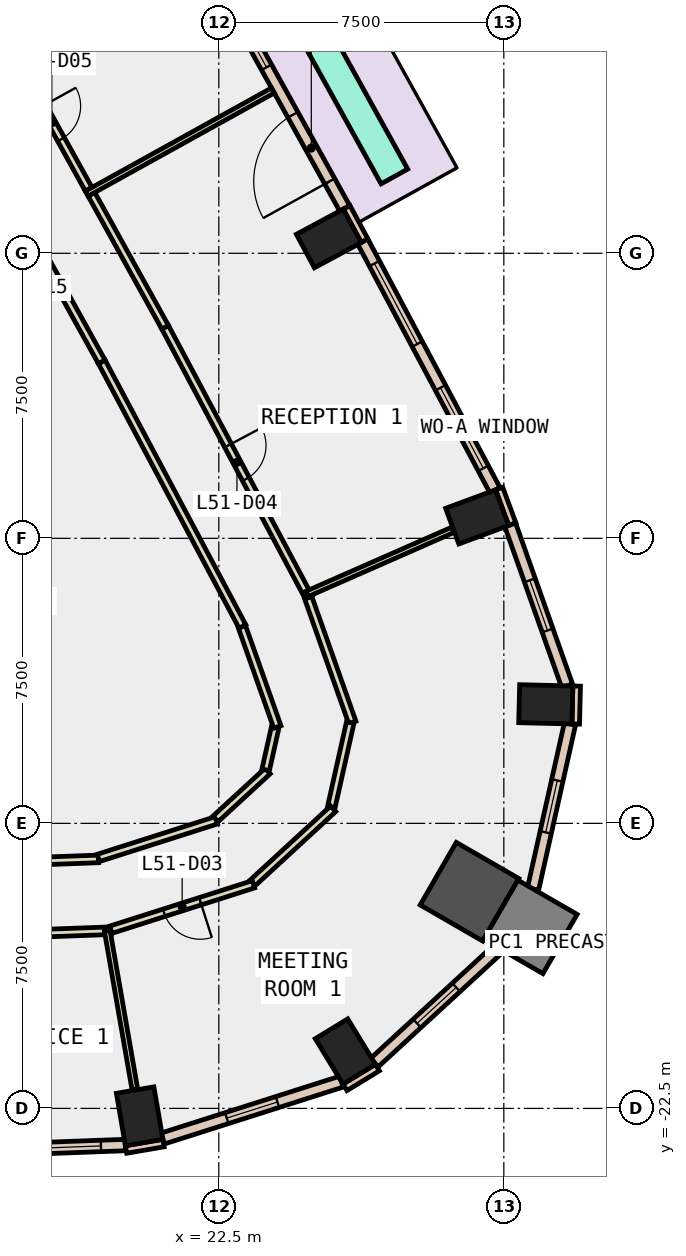
"""IFC4 building model, lengths in metres.
Left out: names, types, materials, properties, quantities, classifications, styles, units other than length and angle.
Written with IfcOpenShell. Run it as: python <this file> out.ifc"""

import sys

from ifc_helpers import new_model, si_unit, direction, frame, frame_2d, origin, origin_2d, place, context, subcontext, project, spatial, rectangle, extrude, element, fill, save


model = new_model("IFC4")
c1 = context("Model", 3, precision=1e-05, world=origin(), true_north=direction((0.0, 1.0)))
c2 = subcontext(c1, "Body", "Model", "MODEL_VIEW")
j1 = project(units=[si_unit("LENGTHUNIT", "METRE"), si_unit("PLANEANGLEUNIT", "RADIAN")], contexts=[c1])
p1 = place(None, origin())
s1 = spatial("IfcSite", under=j1, at=p1, CompositionType="ELEMENT")
p2 = place(p1, origin())
s2 = spatial("IfcBuilding", under=s1, at=p2, CompositionType="ELEMENT")
p3 = place(p2, frame((0.0, 0.0, 227.6)))
s3 = spatial("IfcBuildingStorey", under=s2, at=p3, CompositionType="ELEMENT", Elevation=227.6)
for number, where, z_axis, x_axis in (
    (1, (20.417, -22.708, -0.4), (0.0, 0.0, 1.0), (0.986, 0.169, 0.0)),
    (2, (25.83, -21.003, -0.4), (0.0, 0.0, 1.0), (0.853, 0.521, 0.0)),
):
    element("IfcColumn", number, at=place(p3, frame(where, z_axis=z_axis, x_axis=x_axis)), inside=s3, PredefinedType="COLUMN", context=c2, shape_type="SweptSolid", body=[
        extrude(rectangle(XDim=1.0, YDim=1.4, at=origin_2d()), origin(), (0.0, 0.0, 1.0), 4.2),
    ])
p4 = place(p3, frame((29.097, -16.799, -0.4), z_axis=(0.0, 0.0, 1.0), x_axis=(-0.866025403784, 0.5, 0.0)))
e3 = element("IfcColumn", 3, at=p4, inside=s3, PredefinedType="COLUMN", context=c2, shape_type="SweptSolid", body=[
    extrude(rectangle(XDim=1.9, YDim=1.9, at=origin_2d()), origin(), (0.0, 0.0, 1.0), 4.2),
])
for number, where, z_axis, x_axis in (
    (4, (31.104, -11.868, -0.4), (0.0, 0.0, 1.0), (0.025, 1.0, 0.0)),
    (5, (29.299, -6.936, -0.4), (0.0, 0.0, 1.0), (-0.347, 0.938, 0.0)),
    (6, (25.395, 0.391, -0.4), (0.0, 0.0, 1.0), (-0.474, 0.88, 0.0)),
):
    element("IfcColumn", number, at=place(p3, frame(where, z_axis=z_axis, x_axis=x_axis)), inside=s3, PredefinedType="COLUMN", context=c2, shape_type="SweptSolid", body=[
        extrude(rectangle(XDim=1.0, YDim=1.4, at=origin_2d()), origin(), (0.0, 0.0, 1.0), 4.2),
    ])
p5 = place(p3, frame((30.699, -17.724, -0.4), z_axis=(0.0, 0.0, 1.0), x_axis=(-0.866025403784, 0.5, 0.0)))
e7 = element("IfcColumn", 7, at=p5, inside=s3, PredefinedType="COLUMN", context=c2, shape_type="SweptSolid", body=[
    extrude(rectangle(XDim=1.8, YDim=1.8, at=origin_2d()), origin(), (0.0, 0.0, 1.0), 4.2),
])
p6 = place(p3, frame((30.223, -7.128, 0.0), z_axis=(0.0, 0.0, 1.0), x_axis=(-0.346892928577, 0.937904737222, 0.0)))
e8 = element("IfcWall", 8, at=p6, inside=s3, PredefinedType="STANDARD", context=c2, shape_type="SweptSolid", body=[
    extrude(rectangle(XDim=1.0, YDim=0.2, at=frame_2d((0.5, 0.0))), origin(), (0.0, 0.0, 1.0), 3.8),
])
for number, where, z_axis, x_axis in (
    (9, (26.336, 0.33, 0.0), (0.0, 0.0, 1.0), (-0.474, 0.881, 0.0)),
    (10, (20.059, -23.581, 0.0), (0.0, 0.0, 1.0), (0.986, 0.169, 0.0)),
):
    element("IfcWall", number, at=place(p3, frame(where, z_axis=z_axis, x_axis=x_axis)), inside=s3, PredefinedType="STANDARD", context=c2, shape_type="SweptSolid", body=[
        extrude(rectangle(XDim=1.0, YDim=0.2, at=frame_2d((0.5, 0.0))), origin(), (0.0, 0.0, 1.0), 3.8),
    ])
p7 = place(p3, frame((25.82, -21.946, 0.0), z_axis=(0.0, 0.0, 1.0), x_axis=(0.853679739553, 0.520798331677, 0.0)))
e11 = element("IfcWall", 11, at=p7, inside=s3, PredefinedType="STANDARD", context=c2, shape_type="SweptSolid", body=[
    extrude(rectangle(XDim=1.0, YDim=0.2, at=frame_2d((0.5, 0.0))), origin(), (0.0, 0.0, 1.0), 3.8),
])
p8 = place(p3, frame((31.892, -12.387, 0.0), z_axis=(0.0, 0.0, 1.0), x_axis=(0.023942303888, 0.999713341956, 0.0)))
e12 = element("IfcWall", 12, at=p8, inside=s3, PredefinedType="STANDARD", context=c2, shape_type="SweptSolid", body=[
    extrude(rectangle(XDim=0.999, YDim=0.2, at=frame_2d((0.5, 0.0))), origin(), (0.0, 0.0, 1.0), 3.8),
])
p9 = place(p3, frame((14.679, -23.662, 0.0), z_axis=(0.0, 0.0, 1.0), x_axis=(0.999318693414, 0.036907302717, 0.0)))
e13 = element("IfcWall", 13, at=p9, inside=s3, PredefinedType="STANDARD", context=c2, shape_type="SweptSolid", body=[
    extrude(rectangle(XDim=5.365, YDim=0.3, at=frame_2d((2.682, 0.0))), origin(), (0.0, 0.0, 1.0), 3.8),
])
p10 = place(p9, frame((0.641, 0.0, 0.9)))
e14 = element("IfcOpeningElement", 14, at=p10, cuts=e13, PredefinedType="OPENING", context=c2, shape_type="SweptSolid", body=[
    extrude(rectangle(XDim=1.4, YDim=2.6, at=frame_2d((0.7, 1.3))), frame((0.0, 0.16, 0.0), z_axis=(0.0, -1.0, 0.0), x_axis=(1.0, 0.0, 0.0)), (0.0, 0.0, 1.0), 0.32),
])
p11 = place(p9, frame((3.323, 0.0, 0.9)))
e15 = element("IfcOpeningElement", 15, at=p11, cuts=e13, PredefinedType="OPENING", context=c2, shape_type="SweptSolid", body=[
    extrude(rectangle(XDim=1.4, YDim=2.6, at=frame_2d((0.7, 1.3))), frame((0.0, 0.16, 0.0), z_axis=(0.0, -1.0, 0.0), x_axis=(1.0, 0.0, 0.0)), (0.0, 0.0, 1.0), 0.32),
])
p12 = place(p3, frame((21.023, -23.293, 0.0), z_axis=(0.0, 0.0, 1.0), x_axis=(0.952886818649, 0.30332608006, 0.0)))
e16 = element("IfcWall", 16, at=p12, inside=s3, PredefinedType="STANDARD", context=c2, shape_type="SweptSolid", body=[
    extrude(rectangle(XDim=4.939, YDim=0.3, at=frame_2d((2.469, 0.0))), origin(), (0.0, 0.0, 1.0), 3.8),
])
p13 = place(p12, frame((1.769, 0.0, 0.9)))
e17 = element("IfcOpeningElement", 17, at=p13, cuts=e16, PredefinedType="OPENING", context=c2, shape_type="SweptSolid", body=[
    extrude(rectangle(XDim=1.4, YDim=2.6, at=frame_2d((0.7, 1.3))), frame((0.0, 0.16, 0.0), z_axis=(0.0, -1.0, 0.0), x_axis=(1.0, 0.0, 0.0)), (0.0, 0.0, 1.0), 0.32),
])
p14 = place(p3, frame((26.594, -21.296, 0.0), z_axis=(0.0, 0.0, 1.0), x_axis=(0.735927731403, 0.67706009641, 0.0)))
e18 = element("IfcWall", 18, at=p14, inside=s3, PredefinedType="STANDARD", context=c2, shape_type="SweptSolid", body=[
    extrude(rectangle(XDim=4.45, YDim=0.3, at=frame_2d((2.225, 0.0))), origin(), (0.0, 0.0, 1.0), 3.8),
])
p15 = place(p14, frame((1.525, 0.0, 0.9)))
e19 = element("IfcOpeningElement", 19, at=p15, cuts=e18, PredefinedType="OPENING", context=c2, shape_type="SweptSolid", body=[
    extrude(rectangle(XDim=1.4, YDim=2.6, at=frame_2d((0.7, 1.3))), frame((0.0, 0.16, 0.0), z_axis=(0.0, -1.0, 0.0), x_axis=(1.0, 0.0, 0.0)), (0.0, 0.0, 1.0), 0.32),
])
p16 = place(p3, frame((30.769, -16.726, 0.0), z_axis=(0.0, 0.0, 1.0), x_axis=(0.218179157422, 0.975908733062, 0.0)))
e20 = element("IfcWall", 20, at=p16, inside=s3, PredefinedType="STANDARD", context=c2, shape_type="SweptSolid", body=[
    extrude(rectangle(XDim=4.45, YDim=0.3, at=frame_2d((2.225, 0.0))), origin(), (0.0, 0.0, 1.0), 3.8),
])
p17 = place(p16, frame((1.525, 0.0, 0.9)))
e21 = element("IfcOpeningElement", 21, at=p17, cuts=e20, PredefinedType="OPENING", context=c2, shape_type="SweptSolid", body=[
    extrude(rectangle(XDim=1.4, YDim=2.6, at=frame_2d((0.7, 1.3))), frame((0.0, 0.16, 0.0), z_axis=(0.0, -1.0, 0.0), x_axis=(1.0, 0.0, 0.0)), (0.0, 0.0, 1.0), 0.32),
])
p18 = place(p3, frame((31.666, -11.382, 0.0), z_axis=(0.0, 0.0, 1.0), x_axis=(-0.333280640478, 0.942827669663, 0.0)))
e22 = element("IfcWall", 22, at=p18, inside=s3, PredefinedType="STANDARD", context=c2, shape_type="SweptSolid", body=[
    extrude(rectangle(XDim=4.492, YDim=0.3, at=frame_2d((2.246, 0.0))), origin(), (0.0, 0.0, 1.0), 3.8),
])
p19 = place(p18, frame((1.546, 0.0, 0.9)))
e23 = element("IfcOpeningElement", 23, at=p19, cuts=e22, PredefinedType="OPENING", context=c2, shape_type="SweptSolid", body=[
    extrude(rectangle(XDim=1.4, YDim=2.6, at=frame_2d((0.7, 1.3))), frame((0.0, 0.16, 0.0), z_axis=(0.0, -1.0, 0.0), x_axis=(1.0, 0.0, 0.0)), (0.0, 0.0, 1.0), 0.32),
])
p20 = place(p3, frame((29.765, -6.232, 0.0), z_axis=(0.0, 0.0, 1.0), x_axis=(-0.469429229062, 0.882970100797, 0.0)))
e24 = element("IfcWall", 24, at=p20, inside=s3, PredefinedType="STANDARD", context=c2, shape_type="SweptSolid", body=[
    extrude(rectangle(XDim=7.404, YDim=0.3, at=frame_2d((3.702, 0.0))), origin(), (0.0, 0.0, 1.0), 3.8),
])
p21 = place(p20, frame((0.651, 0.0, 0.9)))
e25 = element("IfcOpeningElement", 25, at=p21, cuts=e24, PredefinedType="OPENING", context=c2, shape_type="SweptSolid", body=[
    extrude(rectangle(XDim=2.4, YDim=2.6, at=frame_2d((1.2, 1.3))), frame((0.0, 0.16, 0.0), z_axis=(0.0, -1.0, 0.0), x_axis=(1.0, 0.0, 0.0)), (0.0, 0.0, 1.0), 0.32),
])
p22 = place(p20, frame((4.353, 0.0, 0.9)))
e26 = element("IfcOpeningElement", 26, at=p22, cuts=e24, PredefinedType="OPENING", context=c2, shape_type="SweptSolid", body=[
    extrude(rectangle(XDim=2.4, YDim=2.6, at=frame_2d((1.2, 1.3))), frame((0.0, 0.16, 0.0), z_axis=(0.0, -1.0, 0.0), x_axis=(1.0, 0.0, 0.0)), (0.0, 0.0, 1.0), 0.32),
])
p23 = place(p3, frame((25.813, 1.183, 0.0), z_axis=(0.0, 0.0, 1.0), x_axis=(-0.484742980126, 0.874656643043, 0.0)))
e27 = element("IfcWall", 27, at=p23, inside=s3, PredefinedType="STANDARD", context=c2, shape_type="SweptSolid", body=[
    extrude(rectangle(XDim=7.258, YDim=0.3, at=frame_2d((3.629, 0.0))), origin(), (0.0, 0.0, 1.0), 3.8),
])
p24 = place(p23, frame((0.814, 0.0, 0.0)))
e28 = element("IfcOpeningElement", 28, at=p24, cuts=e27, PredefinedType="OPENING", context=c2, shape_type="SweptSolid", body=[
    extrude(rectangle(XDim=2.0, YDim=2.4, at=frame_2d((1.0, 1.2))), frame((0.0, 0.16, 0.0), z_axis=(0.0, -1.0, 0.0), x_axis=(1.0, 0.0, 0.0)), (0.0, 0.0, 1.0), 0.32),
])
p25 = place(p23, frame((4.243, 0.0, 0.9)))
e29 = element("IfcOpeningElement", 29, at=p25, cuts=e27, PredefinedType="OPENING", context=c2, shape_type="SweptSolid", body=[
    extrude(rectangle(XDim=2.4, YDim=2.6, at=frame_2d((1.2, 1.3))), frame((0.0, 0.16, 0.0), z_axis=(0.0, -1.0, 0.0), x_axis=(1.0, 0.0, 0.0)), (0.0, 0.0, 1.0), 0.32),
])
p26 = place(p3, frame((27.121, 2.021, 0.0), z_axis=(0.0, 0.0, 1.0), x_axis=(-0.484785237665, 0.874633222181, 0.0)))
e30 = element("IfcWall", 30, at=p26, inside=s3, PredefinedType="STANDARD", context=c2, shape_type="SweptSolid", body=[
    extrude(rectangle(XDim=7.059, YDim=0.8, at=frame_2d((3.53, 0.0))), origin(), (0.0, 0.0, 1.0), 0.8),
])
p27 = place(p3, frame((13.954, -16.133, 0.0), z_axis=(0.0, 0.0, 1.0), x_axis=(0.999323686931, 0.036771847101, 0.0)))
e31 = element("IfcWall", 31, at=p27, inside=s3, PredefinedType="PARTITIONING", context=c2, shape_type="SweptSolid", body=[
    extrude(rectangle(XDim=5.385, YDim=0.2, at=frame_2d((2.692, 0.0))), origin(), (0.0, 0.0, 1.0), 3.8),
])
p28 = place(p3, frame((19.33, -15.909, 0.0), z_axis=(0.0, 0.0, 1.0), x_axis=(0.952831275662, 0.303500510906, 0.0)))
e32 = element("IfcWall", 32, at=p28, inside=s3, PredefinedType="PARTITIONING", context=c2, shape_type="SweptSolid", body=[
    extrude(rectangle(XDim=3.259, YDim=0.2, at=frame_2d((1.629, 0.0))), origin(), (0.0, 0.0, 1.0), 3.8),
])
p29 = place(p3, frame((22.414, -14.883, 0.0), z_axis=(0.0, 0.0, 1.0), x_axis=(0.735983257634, 0.676999737432, 0.0)))
e33 = element("IfcWall", 33, at=p29, inside=s3, PredefinedType="PARTITIONING", context=c2, shape_type="SweptSolid", body=[
    extrude(rectangle(XDim=1.863, YDim=0.2, at=frame_2d((0.931, 0.0))), origin(), (0.0, 0.0, 1.0), 3.8),
])
p30 = place(p3, frame((23.733, -13.592, 0.0), z_axis=(0.0, 0.0, 1.0), x_axis=(0.218746220366, 0.975781784558, 0.0)))
e34 = element("IfcWall", 34, at=p30, inside=s3, PredefinedType="PARTITIONING", context=c2, shape_type="SweptSolid", body=[
    extrude(rectangle(XDim=1.153, YDim=0.2, at=frame_2d((0.576, 0.0))), origin(), (0.0, 0.0, 1.0), 3.8),
])
p31 = place(p3, frame((24.04, -12.463, 0.0), z_axis=(0.0, 0.0, 1.0), x_axis=(-0.333166995935, 0.942867834227, 0.0)))
e35 = element("IfcWall", 35, at=p31, inside=s3, PredefinedType="PARTITIONING", context=c2, shape_type="SweptSolid", body=[
    extrude(rectangle(XDim=2.798, YDim=0.2, at=frame_2d((1.399, 0.0))), origin(), (0.0, 0.0, 1.0), 3.8),
])
p32 = place(p3, frame((23.121, -9.819, 0.0), z_axis=(0.0, 0.0, 1.0), x_axis=(-0.469450210487, 0.882958945746, 0.0)))
e36 = element("IfcWall", 36, at=p32, inside=s3, PredefinedType="PARTITIONING", context=c2, shape_type="SweptSolid", body=[
    extrude(rectangle(XDim=7.886, YDim=0.2, at=frame_2d((3.943, 0.0))), origin(), (0.0, 0.0, 1.0), 3.8),
])
p33 = place(p3, frame((19.419, -2.856, 0.0), z_axis=(0.0, 0.0, 1.0), x_axis=(-0.484683114876, 0.874689818252, 0.0)))
e37 = element("IfcWall", 37, at=p33, inside=s3, PredefinedType="PARTITIONING", context=c2, shape_type="SweptSolid", body=[
    extrude(rectangle(XDim=8.123, YDim=0.2, at=frame_2d((4.062, 0.0))), origin(), (0.0, 0.0, 1.0), 3.8),
])
p34 = place(p33, frame((3.161, 0.0, 0.0)))
e38 = element("IfcOpeningElement", 38, at=p34, cuts=e37, PredefinedType="OPENING", context=c2, shape_type="SweptSolid", body=[
    extrude(rectangle(XDim=1.8, YDim=2.1, at=frame_2d((0.9, 1.05))), frame((0.0, 0.11, 0.0), z_axis=(0.0, -1.0, 0.0), x_axis=(1.0, 0.0, 0.0)), (0.0, 0.0, 1.0), 0.22),
])
p35 = place(p3, frame((19.664, -17.824, 0.0), z_axis=(0.0, 0.0, 1.0), x_axis=(-0.999324862533, -0.036739884652, 0.0)))
e39 = element("IfcWall", 39, at=p35, inside=s3, PredefinedType="PARTITIONING", context=c2, shape_type="SweptSolid", body=[
    extrude(rectangle(XDim=5.582, YDim=0.2, at=frame_2d((2.791, 0.0))), origin(), (0.0, 0.0, 1.0), 3.8),
])
p36 = place(p35, frame((2.366, 0.0, 0.0)))
e40 = element("IfcOpeningElement", 40, at=p36, cuts=e39, PredefinedType="OPENING", context=c2, shape_type="SweptSolid", body=[
    extrude(rectangle(XDim=1.0, YDim=2.1, at=frame_2d((0.5, 1.05))), frame((0.0, 0.11, 0.0), z_axis=(0.0, -1.0, 0.0), x_axis=(1.0, 0.0, 0.0)), (0.0, 0.0, 1.0), 0.22),
])
p37 = place(p3, frame((24.852, -9.059, 0.0), z_axis=(0.0, 0.0, 1.0), x_axis=(0.333116923704, -0.942885526001, 0.0)))
e41 = element("IfcWall", 41, at=p37, inside=s3, PredefinedType="PARTITIONING", context=c2, shape_type="SweptSolid", body=[
    extrude(rectangle(XDim=3.485, YDim=0.2, at=frame_2d((1.742, 0.0))), origin(), (0.0, 0.0, 1.0), 3.8),
])
p38 = place(p3, frame((25.958, -12.348, 0.0), z_axis=(0.0, 0.0, 1.0), x_axis=(-0.2183498404, -0.975870558628, 0.0)))
e42 = element("IfcWall", 42, at=p38, inside=s3, PredefinedType="PARTITIONING", context=c2, shape_type="SweptSolid", body=[
    extrude(rectangle(XDim=2.294, YDim=0.2, at=frame_2d((1.147, 0.0))), origin(), (0.0, 0.0, 1.0), 3.8),
])
p39 = place(p3, frame((25.509, -14.617, 0.0), z_axis=(0.0, 0.0, 1.0), x_axis=(-0.735846476242, -0.677148405745, 0.0)))
e43 = element("IfcWall", 43, at=p39, inside=s3, PredefinedType="PARTITIONING", context=c2, shape_type="SweptSolid", body=[
    extrude(rectangle(XDim=2.878, YDim=0.2, at=frame_2d((1.439, 0.0))), origin(), (0.0, 0.0, 1.0), 3.8),
])
p40 = place(p3, frame((23.412, -16.603, 0.0), z_axis=(0.0, 0.0, 1.0), x_axis=(-0.952838618572, -0.303477457083, 0.0)))
e44 = element("IfcWall", 44, at=p40, inside=s3, PredefinedType="PARTITIONING", context=c2, shape_type="SweptSolid", body=[
    extrude(rectangle(XDim=3.938, YDim=0.2, at=frame_2d((1.969, 0.0))), origin(), (0.0, 0.0, 1.0), 3.8),
])
p41 = place(p40, frame((1.469, 0.0, 0.0)))
e45 = element("IfcOpeningElement", 45, at=p41, cuts=e44, PredefinedType="OPENING", context=c2, shape_type="SweptSolid", body=[
    extrude(rectangle(XDim=1.0, YDim=2.1, at=frame_2d((0.5, 1.05))), frame((0.0, 0.11, 0.0), z_axis=(0.0, -1.0, 0.0), x_axis=(1.0, 0.0, 0.0)), (0.0, 0.0, 1.0), 0.22),
])
p42 = place(p3, frame((19.149, 1.553, 0.0), z_axis=(0.0, 0.0, 1.0), x_axis=(0.484622593188, -0.874723351793, 0.0)))
e46 = element("IfcWall", 46, at=p42, inside=s3, PredefinedType="PARTITIONING", context=c2, shape_type="SweptSolid", body=[
    extrude(rectangle(XDim=4.003, YDim=0.2, at=frame_2d((2.002, 0.0))), origin(), (0.0, 0.0, 1.0), 3.8),
])
p43 = place(p3, frame((21.089, -1.949, 0.0), z_axis=(0.0, 0.0, 1.0), x_axis=(0.469431794586, -0.882968736837, 0.0)))
e47 = element("IfcWall", 47, at=p43, inside=s3, PredefinedType="PARTITIONING", context=c2, shape_type="SweptSolid", body=[
    extrude(rectangle(XDim=8.046, YDim=0.2, at=frame_2d((4.023, 0.0))), origin(), (0.0, 0.0, 1.0), 3.8),
])
p44 = place(p43, frame((3.522, 0.0, 0.0)))
e48 = element("IfcOpeningElement", 48, at=p44, cuts=e47, PredefinedType="OPENING", context=c2, shape_type="SweptSolid", body=[
    extrude(rectangle(XDim=1.0, YDim=2.1, at=frame_2d((0.5, 1.05))), frame((0.0, 0.11, 0.0), z_axis=(0.0, -1.0, 0.0), x_axis=(1.0, 0.0, 0.0)), (0.0, 0.0, 1.0), 0.22),
])
p45 = place(p3, frame((17.136, 5.185, 0.0), z_axis=(0.0, 0.0, 1.0), x_axis=(0.484679349661, -0.874691904623, 0.0)))
e49 = element("IfcWall", 49, at=p45, inside=s3, PredefinedType="PARTITIONING", context=c2, shape_type="SweptSolid", body=[
    extrude(rectangle(XDim=4.002, YDim=0.2, at=frame_2d((2.001, 0.0))), origin(), (0.0, 0.0, 1.0), 3.8),
])
p46 = place(p45, frame((1.501, 0.0, 0.0)))
e50 = element("IfcOpeningElement", 50, at=p46, cuts=e49, PredefinedType="OPENING", context=c2, shape_type="SweptSolid", body=[
    extrude(rectangle(XDim=1.0, YDim=2.1, at=frame_2d((0.5, 1.05))), frame((0.0, 0.11, 0.0), z_axis=(0.0, -1.0, 0.0), x_axis=(1.0, 0.0, 0.0)), (0.0, 0.0, 1.0), 0.22),
])
p47 = place(p3, frame((19.564, -17.828, 0.0), z_axis=(0.0, 0.0, 1.0), x_axis=(0.171715909123, -0.985146510197, 0.0)))
e51 = element("IfcWall", 51, at=p47, inside=s3, PredefinedType="PARTITIONING", context=c2, shape_type="SweptSolid", body=[
    extrude(rectangle(XDim=4.234, YDim=0.15, at=frame_2d((2.117, 0.0))), origin(), (0.0, 0.0, 1.0), 3.8),
])
p48 = place(p3, frame((24.819, -8.964, 0.0), z_axis=(0.0, 0.0, 1.0), x_axis=(0.915460951187, 0.402406817602, 0.0)))
e52 = element("IfcWall", 52, at=p48, inside=s3, PredefinedType="PARTITIONING", context=c2, shape_type="SweptSolid", body=[
    extrude(rectangle(XDim=4.192, YDim=0.15, at=frame_2d((2.096, 0.0))), origin(), (0.0, 0.0, 1.0), 3.8),
])
p49 = place(p3, frame((19.025, 1.57, 0.0), z_axis=(0.0, 0.0, 1.0), x_axis=(0.874714019242, 0.484639437666, 0.0)))
e53 = element("IfcWall", 53, at=p49, inside=s3, PredefinedType="PARTITIONING", context=c2, shape_type="SweptSolid", body=[
    extrude(rectangle(XDim=5.6, YDim=0.15, at=frame_2d((2.8, 0.0))), origin(), (0.0, 0.0, 1.0), 3.8),
])
p50 = place(p11, origin())
e54 = element("IfcWindow", 54, at=p50, inside=s3, PartitioningType="SINGLE_PANEL", PredefinedType="WINDOW", context=c2, shape_type="SweptSolid", body=[
    extrude(rectangle(XDim=1.4, YDim=2.6, at=frame_2d((0.7, 1.3))), frame((0.0, 0.03, 0.0), z_axis=(0.0, -1.0, 0.0), x_axis=(1.0, 0.0, 0.0)), (0.0, 0.0, 1.0), 0.06),
])
fill(e15, e54)
p51 = place(p13, origin())
e55 = element("IfcWindow", 55, at=p51, inside=s3, PartitioningType="SINGLE_PANEL", PredefinedType="WINDOW", context=c2, shape_type="SweptSolid", body=[
    extrude(rectangle(XDim=1.4, YDim=2.6, at=frame_2d((0.7, 1.3))), frame((0.0, 0.03, 0.0), z_axis=(0.0, -1.0, 0.0), x_axis=(1.0, 0.0, 0.0)), (0.0, 0.0, 1.0), 0.06),
])
fill(e17, e55)
p52 = place(p15, origin())
e56 = element("IfcWindow", 56, at=p52, inside=s3, PartitioningType="SINGLE_PANEL", PredefinedType="WINDOW", context=c2, shape_type="SweptSolid", body=[
    extrude(rectangle(XDim=1.4, YDim=2.6, at=frame_2d((0.7, 1.3))), frame((0.0, 0.03, 0.0), z_axis=(0.0, -1.0, 0.0), x_axis=(1.0, 0.0, 0.0)), (0.0, 0.0, 1.0), 0.06),
])
fill(e19, e56)
p53 = place(p17, origin())
e57 = element("IfcWindow", 57, at=p53, inside=s3, PartitioningType="SINGLE_PANEL", PredefinedType="WINDOW", context=c2, shape_type="SweptSolid", body=[
    extrude(rectangle(XDim=1.4, YDim=2.6, at=frame_2d((0.7, 1.3))), frame((0.0, 0.03, 0.0), z_axis=(0.0, -1.0, 0.0), x_axis=(1.0, 0.0, 0.0)), (0.0, 0.0, 1.0), 0.06),
])
fill(e21, e57)
p54 = place(p19, origin())
e58 = element("IfcWindow", 58, at=p54, inside=s3, PartitioningType="SINGLE_PANEL", PredefinedType="WINDOW", context=c2, shape_type="SweptSolid", body=[
    extrude(rectangle(XDim=1.4, YDim=2.6, at=frame_2d((0.7, 1.3))), frame((0.0, 0.03, 0.0), z_axis=(0.0, -1.0, 0.0), x_axis=(1.0, 0.0, 0.0)), (0.0, 0.0, 1.0), 0.06),
])
fill(e23, e58)
p55 = place(p21, origin())
e59 = element("IfcWindow", 59, at=p55, inside=s3, PartitioningType="SINGLE_PANEL", PredefinedType="WINDOW", context=c2, shape_type="SweptSolid", body=[
    extrude(rectangle(XDim=2.4, YDim=2.6, at=frame_2d((1.2, 1.3))), frame((0.0, 0.03, 0.0), z_axis=(0.0, -1.0, 0.0), x_axis=(1.0, 0.0, 0.0)), (0.0, 0.0, 1.0), 0.06),
])
fill(e25, e59)
p56 = place(p22, origin())
e60 = element("IfcWindow", 60, at=p56, inside=s3, PartitioningType="SINGLE_PANEL", PredefinedType="WINDOW", context=c2, shape_type="SweptSolid", body=[
    extrude(rectangle(XDim=2.4, YDim=2.6, at=frame_2d((1.2, 1.3))), frame((0.0, 0.03, 0.0), z_axis=(0.0, -1.0, 0.0), x_axis=(1.0, 0.0, 0.0)), (0.0, 0.0, 1.0), 0.06),
])
fill(e26, e60)
p57 = place(p24, origin())
e61 = element("IfcDoor", 61, at=p57, inside=s3, OperationType="SLIDING_TO_LEFT", PredefinedType="DOOR", context=c2, shape_type="SweptSolid", body=[
    extrude(rectangle(XDim=2.0, YDim=2.4, at=frame_2d((1.0, 1.2))), frame((0.0, 0.025, 0.0), z_axis=(0.0, -1.0, 0.0), x_axis=(1.0, 0.0, 0.0)), (0.0, 0.0, 1.0), 0.05),
])
fill(e28, e61)
p58 = place(p25, origin())
e62 = element("IfcWindow", 62, at=p58, inside=s3, PartitioningType="SINGLE_PANEL", PredefinedType="WINDOW", context=c2, shape_type="SweptSolid", body=[
    extrude(rectangle(XDim=2.4, YDim=2.6, at=frame_2d((1.2, 1.3))), frame((0.0, 0.03, 0.0), z_axis=(0.0, -1.0, 0.0), x_axis=(1.0, 0.0, 0.0)), (0.0, 0.0, 1.0), 0.06),
])
fill(e29, e62)
p59 = place(p41, origin())
e63 = element("IfcDoor", 63, at=p59, inside=s3, OperationType="SINGLE_SWING_LEFT", PredefinedType="DOOR", context=c2, shape_type="SweptSolid", body=[
    extrude(rectangle(XDim=1.0, YDim=2.1, at=frame_2d((0.5, 1.05))), frame((0.0, 0.025, 0.0), z_axis=(0.0, -1.0, 0.0), x_axis=(1.0, 0.0, 0.0)), (0.0, 0.0, 1.0), 0.05),
])
fill(e45, e63)
p60 = place(p44, origin())
e64 = element("IfcDoor", 64, at=p60, inside=s3, OperationType="SINGLE_SWING_LEFT", PredefinedType="DOOR", context=c2, shape_type="SweptSolid", body=[
    extrude(rectangle(XDim=1.0, YDim=2.1, at=frame_2d((0.5, 1.05))), frame((0.0, 0.025, 0.0), z_axis=(0.0, -1.0, 0.0), x_axis=(1.0, 0.0, 0.0)), (0.0, 0.0, 1.0), 0.05),
])
fill(e48, e64)
p61 = place(p46, origin())
e65 = element("IfcDoor", 65, at=p61, inside=s3, OperationType="SINGLE_SWING_LEFT", PredefinedType="DOOR", context=c2, shape_type="SweptSolid", body=[
    extrude(rectangle(XDim=1.0, YDim=2.1, at=frame_2d((0.5, 1.05))), frame((0.0, 0.025, 0.0), z_axis=(0.0, -1.0, 0.0), x_axis=(1.0, 0.0, 0.0)), (0.0, 0.0, 1.0), 0.05),
])
fill(e50, e65)
save(model, sys.argv[1])
